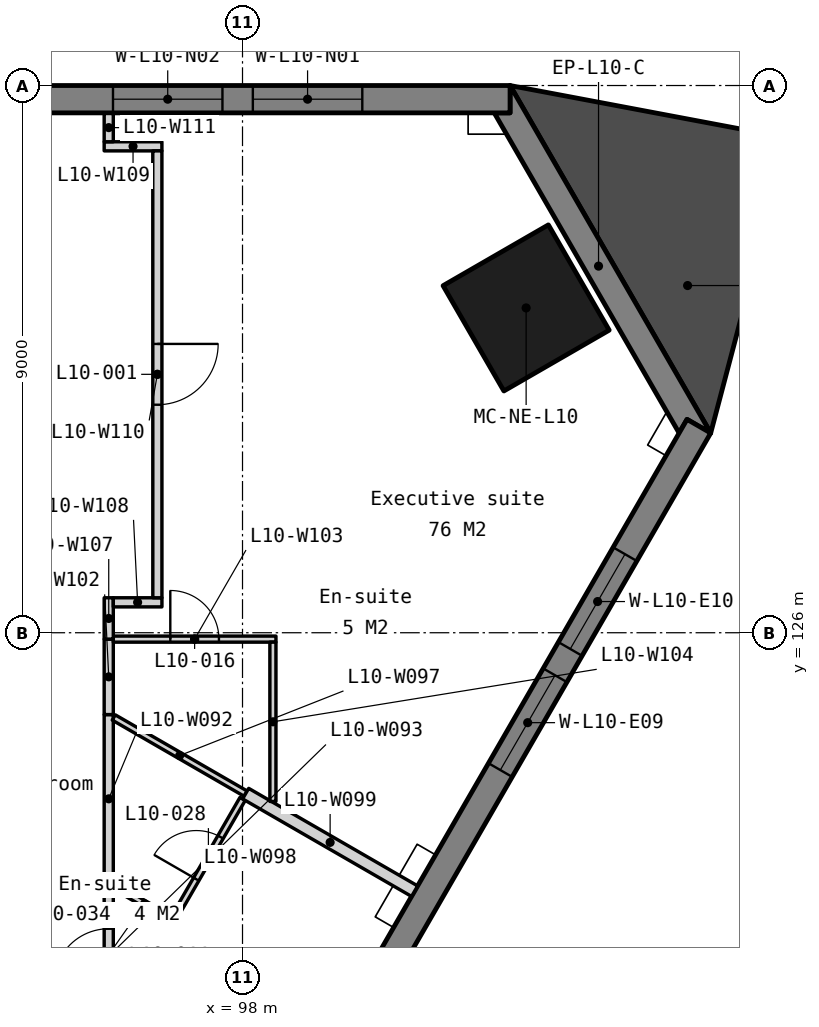
"""IFC4 building model, lengths in metres.
Left out: names, types, materials, properties, quantities, classifications, styles, units other than length and angle.
Written with IfcOpenShell. Run it as: python <this file> out.ifc"""

import sys

from ifc_helpers import new_model, si_unit, direction, frame, frame_2d, origin, origin_2d, place, context, subcontext, project, spatial, polyline, rectangle, outline, extrude, element, fill, save


model = new_model("IFC4")
c1 = context("Model", 3, precision=1e-05, world=origin(), true_north=direction((0.0, 1.0)))
c2 = subcontext(c1, "Body", "Model", "MODEL_VIEW")
j1 = project(units=[si_unit("LENGTHUNIT", "METRE"), si_unit("PLANEANGLEUNIT", "RADIAN")], contexts=[c1])
p1 = place(None, origin())
s1 = spatial("IfcSite", under=j1, at=p1, CompositionType="ELEMENT")
p2 = place(p1, origin())
s2 = spatial("IfcBuilding", under=s1, at=p2, CompositionType="ELEMENT")
p3 = place(p2, frame((0.0, 0.0, 49.0)))
s3 = spatial("IfcBuildingStorey", under=s2, at=p3, CompositionType="ELEMENT", Elevation=49.0)
p4 = place(p3, frame((102.664, 131.342, 0.0), z_axis=(0.0, 0.0, 1.0), x_axis=(-0.5, 0.866025403784, 0.0)))
e1 = element("IfcColumn", 1, at=p4, inside=s3, PredefinedType="COLUMN", context=c2, shape_type="SweptSolid", body=[
    extrude(rectangle(XDim=2.0, YDim=2.0, at=origin_2d()), origin(), (0.0, 0.0, 1.0), 3.5),
])
p5 = place(p3, frame((0.0, 0.0, -0.15)))
e2 = element("IfcWall", 2, at=p5, inside=s3, PredefinedType="SOLIDWALL", context=c2, shape_type="SweptSolid", body=[
    extrude(outline(polyline([(105.7, 129.284), (105.31, 129.509), (105.18, 129.284), (102.14, 134.55), (102.4, 134.55), (102.4, 135.0), (105.7, 129.284)])), origin(), (0.0, 0.0, 1.0), 3.5),
])
p6 = place(p3, frame((102.4, 134.775, -0.15), z_axis=(0.0, 0.0, 1.0), x_axis=(-1.0, 0.0, 0.0)))
e3 = element("IfcWall", 3, at=p6, inside=s3, PredefinedType="SOLIDWALL", context=c2, shape_type="SweptSolid", body=[
    extrude(outline(polyline([(0.0, 0.0), (0.0, 3.5), (38.62, 3.5), (38.62, 0.0), (0.0, 0.0)])), frame((0.0, 0.225, 0.0), z_axis=(0.0, -1.0, 0.0), x_axis=(1.0, 0.0, 0.0)), (0.0, 0.0, 1.0), 0.45),
])
p7 = place(p6, frame((2.43, 0.0, 1.05)))
e4 = element("IfcOpeningElement", 4, at=p7, cuts=e3, PredefinedType="OPENING", context=c2, shape_type="SweptSolid", body=[
    extrude(rectangle(XDim=1.8, YDim=1.5, at=frame_2d((0.9, 0.75))), frame((0.0, 0.235, 0.0), z_axis=(0.0, -1.0, 0.0), x_axis=(1.0, 0.0, 0.0)), (0.0, 0.0, 1.0), 0.47),
])
p8 = place(p6, frame((4.73, 0.0, 1.05)))
e5 = element("IfcOpeningElement", 5, at=p8, cuts=e3, PredefinedType="OPENING", context=c2, shape_type="SweptSolid", body=[
    extrude(rectangle(XDim=1.8, YDim=1.5, at=frame_2d((0.9, 0.75))), frame((0.0, 0.235, 0.0), z_axis=(0.0, -1.0, 0.0), x_axis=(1.0, 0.0, 0.0)), (0.0, 0.0, 1.0), 0.47),
])
p9 = place(p6, frame((11.39, 0.0, 1.05)))
e6 = element("IfcOpeningElement", 6, at=p9, cuts=e3, PredefinedType="OPENING", context=c2, shape_type="SweptSolid", body=[
    extrude(rectangle(XDim=1.8, YDim=1.5, at=frame_2d((0.9, 0.75))), frame((0.0, 0.235, 0.0), z_axis=(0.0, -1.0, 0.0), x_axis=(1.0, 0.0, 0.0)), (0.0, 0.0, 1.0), 0.47),
])
p10 = place(p6, frame((13.69, 0.0, 1.05)))
e7 = element("IfcOpeningElement", 7, at=p10, cuts=e3, PredefinedType="OPENING", context=c2, shape_type="SweptSolid", body=[
    extrude(rectangle(XDim=1.8, YDim=1.5, at=frame_2d((0.9, 0.75))), frame((0.0, 0.235, 0.0), z_axis=(0.0, -1.0, 0.0), x_axis=(1.0, 0.0, 0.0)), (0.0, 0.0, 1.0), 0.47),
])
p11 = place(p6, frame((20.35, 0.0, 1.05)))
e8 = element("IfcOpeningElement", 8, at=p11, cuts=e3, PredefinedType="OPENING", context=c2, shape_type="SweptSolid", body=[
    extrude(rectangle(XDim=1.8, YDim=1.5, at=frame_2d((0.9, 0.75))), frame((0.0, 0.235, 0.0), z_axis=(0.0, -1.0, 0.0), x_axis=(1.0, 0.0, 0.0)), (0.0, 0.0, 1.0), 0.47),
])
p12 = place(p6, frame((22.65, 0.0, 1.05)))
e9 = element("IfcOpeningElement", 9, at=p12, cuts=e3, PredefinedType="OPENING", context=c2, shape_type="SweptSolid", body=[
    extrude(rectangle(XDim=1.8, YDim=1.5, at=frame_2d((0.9, 0.75))), frame((0.0, 0.235, 0.0), z_axis=(0.0, -1.0, 0.0), x_axis=(1.0, 0.0, 0.0)), (0.0, 0.0, 1.0), 0.47),
])
p13 = place(p6, frame((29.31, 0.0, 1.05)))
e10 = element("IfcOpeningElement", 10, at=p13, cuts=e3, PredefinedType="OPENING", context=c2, shape_type="SweptSolid", body=[
    extrude(rectangle(XDim=1.8, YDim=1.5, at=frame_2d((0.9, 0.75))), frame((0.0, 0.235, 0.0), z_axis=(0.0, -1.0, 0.0), x_axis=(1.0, 0.0, 0.0)), (0.0, 0.0, 1.0), 0.47),
])
p14 = place(p6, frame((31.61, 0.0, 1.05)))
e11 = element("IfcOpeningElement", 11, at=p14, cuts=e3, PredefinedType="OPENING", context=c2, shape_type="SweptSolid", body=[
    extrude(rectangle(XDim=1.8, YDim=1.5, at=frame_2d((0.9, 0.75))), frame((0.0, 0.235, 0.0), z_axis=(0.0, -1.0, 0.0), x_axis=(1.0, 0.0, 0.0)), (0.0, 0.0, 1.0), 0.47),
])
p15 = place(p3, frame((83.105, 90.599, -0.15), z_axis=(0.0, 0.0, 1.0), x_axis=(0.499999201451, 0.866025864826, 0.0)))
e12 = element("IfcWall", 12, at=p15, inside=s3, PredefinedType="SOLIDWALL", context=c2, shape_type="SweptSolid", body=[
    extrude(outline(polyline([(44.8, 0.0), (44.8, 3.5), (0.0, 3.5), (0.0, 0.0), (44.8, 0.0)])), frame((0.0, 0.225, 0.0), z_axis=(0.0, -1.0, 0.0), x_axis=(1.0, 0.0, 0.0)), (0.0, 0.0, 1.0), 0.45),
])
p16 = place(p15, frame((2.43, 0.0, 1.05)))
e13 = element("IfcOpeningElement", 13, at=p16, cuts=e12, PredefinedType="OPENING", context=c2, shape_type="SweptSolid", body=[
    extrude(rectangle(XDim=1.8, YDim=1.5, at=frame_2d((0.9, 0.75))), frame((0.0, 0.235, 0.0), z_axis=(0.0, -1.0, 0.0), x_axis=(1.0, 0.0, 0.0)), (0.0, 0.0, 1.0), 0.47),
])
p17 = place(p15, frame((4.73, 0.0, 1.05)))
e14 = element("IfcOpeningElement", 14, at=p17, cuts=e12, PredefinedType="OPENING", context=c2, shape_type="SweptSolid", body=[
    extrude(rectangle(XDim=1.8, YDim=1.5, at=frame_2d((0.9, 0.75))), frame((0.0, 0.235, 0.0), z_axis=(0.0, -1.0, 0.0), x_axis=(1.0, 0.0, 0.0)), (0.0, 0.0, 1.0), 0.47),
])
p18 = place(p15, frame((11.39, 0.0, 1.05)))
e15 = element("IfcOpeningElement", 15, at=p18, cuts=e12, PredefinedType="OPENING", context=c2, shape_type="SweptSolid", body=[
    extrude(rectangle(XDim=1.8, YDim=1.5, at=frame_2d((0.9, 0.75))), frame((0.0, 0.235, 0.0), z_axis=(0.0, -1.0, 0.0), x_axis=(1.0, 0.0, 0.0)), (0.0, 0.0, 1.0), 0.47),
])
p19 = place(p15, frame((13.69, 0.0, 1.05)))
e16 = element("IfcOpeningElement", 16, at=p19, cuts=e12, PredefinedType="OPENING", context=c2, shape_type="SweptSolid", body=[
    extrude(rectangle(XDim=1.8, YDim=1.5, at=frame_2d((0.9, 0.75))), frame((0.0, 0.235, 0.0), z_axis=(0.0, -1.0, 0.0), x_axis=(1.0, 0.0, 0.0)), (0.0, 0.0, 1.0), 0.47),
])
p20 = place(p15, frame((20.35, 0.0, 1.05)))
e17 = element("IfcOpeningElement", 17, at=p20, cuts=e12, PredefinedType="OPENING", context=c2, shape_type="SweptSolid", body=[
    extrude(rectangle(XDim=1.8, YDim=1.5, at=frame_2d((0.9, 0.75))), frame((0.0, 0.235, 0.0), z_axis=(0.0, -1.0, 0.0), x_axis=(1.0, 0.0, 0.0)), (0.0, 0.0, 1.0), 0.47),
])
p21 = place(p15, frame((22.65, 0.0, 1.05)))
e18 = element("IfcOpeningElement", 18, at=p21, cuts=e12, PredefinedType="OPENING", context=c2, shape_type="SweptSolid", body=[
    extrude(rectangle(XDim=1.8, YDim=1.5, at=frame_2d((0.9, 0.75))), frame((0.0, 0.235, 0.0), z_axis=(0.0, -1.0, 0.0), x_axis=(1.0, 0.0, 0.0)), (0.0, 0.0, 1.0), 0.47),
])
p22 = place(p15, frame((29.31, 0.0, 1.05)))
e19 = element("IfcOpeningElement", 19, at=p22, cuts=e12, PredefinedType="OPENING", context=c2, shape_type="SweptSolid", body=[
    extrude(rectangle(XDim=1.8, YDim=1.5, at=frame_2d((0.9, 0.75))), frame((0.0, 0.235, 0.0), z_axis=(0.0, -1.0, 0.0), x_axis=(1.0, 0.0, 0.0)), (0.0, 0.0, 1.0), 0.47),
])
p23 = place(p15, frame((31.61, 0.0, 1.05)))
e20 = element("IfcOpeningElement", 20, at=p23, cuts=e12, PredefinedType="OPENING", context=c2, shape_type="SweptSolid", body=[
    extrude(rectangle(XDim=1.8, YDim=1.5, at=frame_2d((0.9, 0.75))), frame((0.0, 0.235, 0.0), z_axis=(0.0, -1.0, 0.0), x_axis=(1.0, 0.0, 0.0)), (0.0, 0.0, 1.0), 0.47),
])
p24 = place(p15, frame((38.27, 0.0, 1.05)))
e21 = element("IfcOpeningElement", 21, at=p24, cuts=e12, PredefinedType="OPENING", context=c2, shape_type="SweptSolid", body=[
    extrude(rectangle(XDim=1.8, YDim=1.5, at=frame_2d((0.9, 0.75))), frame((0.0, 0.235, 0.0), z_axis=(0.0, -1.0, 0.0), x_axis=(1.0, 0.0, 0.0)), (0.0, 0.0, 1.0), 0.47),
])
p25 = place(p15, frame((40.57, 0.0, 1.05)))
e22 = element("IfcOpeningElement", 22, at=p25, cuts=e12, PredefinedType="OPENING", context=c2, shape_type="SweptSolid", body=[
    extrude(rectangle(XDim=1.8, YDim=1.5, at=frame_2d((0.9, 0.75))), frame((0.0, 0.235, 0.0), z_axis=(0.0, -1.0, 0.0), x_axis=(1.0, 0.0, 0.0)), (0.0, 0.0, 1.0), 0.47),
])
p26 = place(p3, frame((0.0, 0.0, -0.15)))
e23 = element("IfcWall", 23, at=p26, inside=s3, PredefinedType="SOLIDWALL", context=c2, shape_type="SweptSolid", body=[
    extrude(outline(polyline([(105.7, 129.284), (106.981, 134.136), (102.4, 135.0), (105.7, 129.284)])), origin(), (0.0, 0.0, 1.0), 3.5),
])
p27 = place(p3, frame((95.882, 121.835, 0.0), z_axis=(0.0, 0.0, 1.0), x_axis=(0.86601174498, -0.500023656998, 0.0)))
e24 = element("IfcWall", 24, at=p27, inside=s3, PredefinedType="PARTITIONING", context=c2, shape_type="SweptSolid", body=[
    extrude(rectangle(XDim=1.169, YDim=0.1, at=frame_2d((0.585, 0.0))), origin(), (0.0, 0.0, 1.0), 3.35),
])
p28 = place(p3, frame((95.8, 121.883, 0.0), z_axis=(0.0, 0.0, 1.0), x_axis=(0.0, 1.0, 0.0)))
e25 = element("IfcWall", 25, at=p28, inside=s3, PredefinedType="PARTITIONING", context=c2, shape_type="SweptSolid", body=[
    extrude(rectangle(XDim=2.771, YDim=0.15, at=frame_2d((1.386, 0.0))), origin(), (0.0, 0.0, 1.0), 3.35),
])
p29 = place(p3, frame((95.8, 119.481, 0.0), z_axis=(0.0, 0.0, 1.0), x_axis=(0.0, 1.0, 0.0)))
e26 = element("IfcWall", 26, at=p29, inside=s3, PredefinedType="PARTITIONING", context=c2, shape_type="SweptSolid", body=[
    extrude(rectangle(XDim=2.402, YDim=0.15, at=frame_2d((1.201, 0.0))), origin(), (0.0, 0.0, 1.0), 3.35),
])
p30 = place(p29, frame((0.751, 0.0, 0.0)))
e27 = element("IfcOpeningElement", 27, at=p30, cuts=e26, PredefinedType="OPENING", context=c2, shape_type="SweptSolid", body=[
    extrude(rectangle(XDim=0.9, YDim=2.1, at=frame_2d((0.45, 1.05))), frame((0.0, 0.085, 0.0), z_axis=(0.0, -1.0, 0.0), x_axis=(1.0, 0.0, 0.0)), (0.0, 0.0, 1.0), 0.17),
])
p31 = place(p3, frame((95.882, 124.606, 0.0), z_axis=(0.0, 0.0, 1.0), x_axis=(0.866039519639, -0.499975549825, 0.0)))
e28 = element("IfcWall", 28, at=p31, inside=s3, PredefinedType="PARTITIONING", context=c2, shape_type="SweptSolid", body=[
    extrude(rectangle(XDim=2.505, YDim=0.1, at=frame_2d((1.252, 0.0))), origin(), (0.0, 0.0, 1.0), 3.35),
])
p32 = place(p3, frame((96.877, 121.319, 0.0), z_axis=(0.0, 0.0, 1.0), x_axis=(0.499966648284, 0.866044658551, 0.0)))
e29 = element("IfcWall", 29, at=p32, inside=s3, PredefinedType="PARTITIONING", context=c2, shape_type="SweptSolid", body=[
    extrude(rectangle(XDim=2.25, YDim=0.1, at=frame_2d((1.125, 0.0))), origin(), (0.0, 0.0, 1.0), 3.35),
])
p33 = place(p32, frame((0.725, 0.0, 0.0)))
e30 = element("IfcOpeningElement", 30, at=p33, cuts=e29, PredefinedType="OPENING", context=c2, shape_type="SweptSolid", body=[
    extrude(rectangle(XDim=0.8, YDim=2.1, at=frame_2d((0.4, 1.05))), frame((0.0, 0.06, 0.0), z_axis=(0.0, -1.0, 0.0), x_axis=(1.0, 0.0, 0.0)), (0.0, 0.0, 1.0), 0.12),
])
p34 = place(p3, frame((98.052, 123.354, 0.0), z_axis=(0.0, 0.0, 1.0), x_axis=(0.866019585306, -0.500010077765, 0.0)))
e31 = element("IfcWall", 31, at=p34, inside=s3, PredefinedType="PARTITIONING", context=c2, shape_type="SweptSolid", body=[
    extrude(rectangle(XDim=3.208, YDim=0.2, at=frame_2d((1.604, 0.0))), origin(), (0.0, 0.0, 1.0), 3.35),
])
p35 = place(p3, frame((95.8, 124.654, 0.0), z_axis=(0.0, 0.0, 1.0), x_axis=(0.0, 1.0, 0.0)))
e32 = element("IfcWall", 32, at=p35, inside=s3, PredefinedType="PARTITIONING", context=c2, shape_type="SweptSolid", body=[
    extrude(rectangle(XDim=1.241, YDim=0.15, at=frame_2d((0.621, 0.0))), origin(), (0.0, 0.0, 1.0), 3.35),
])
p36 = place(p3, frame((95.875, 125.895, 0.0), z_axis=(0.0, 0.0, 1.0), x_axis=(1.0, 0.0, 0.0)))
e33 = element("IfcWall", 33, at=p36, inside=s3, PredefinedType="PARTITIONING", context=c2, shape_type="SweptSolid", body=[
    extrude(rectangle(XDim=2.675, YDim=0.1, at=frame_2d((1.337, 0.0))), origin(), (0.0, 0.0, 1.0), 3.35),
])
p37 = place(p36, frame((0.938, 0.0, 0.0)))
e34 = element("IfcOpeningElement", 34, at=p37, cuts=e33, PredefinedType="OPENING", context=c2, shape_type="SweptSolid", body=[
    extrude(rectangle(XDim=0.8, YDim=2.1, at=frame_2d((0.4, 1.05))), frame((0.0, 0.06, 0.0), z_axis=(0.0, -1.0, 0.0), x_axis=(1.0, 0.0, 0.0)), (0.0, 0.0, 1.0), 0.12),
])
p38 = place(p3, frame((98.5, 123.225, 0.0), z_axis=(0.0, 0.0, 1.0), x_axis=(0.0, 1.0, 0.0)))
e35 = element("IfcWall", 35, at=p38, inside=s3, PredefinedType="PARTITIONING", context=c2, shape_type="SweptSolid", body=[
    extrude(rectangle(XDim=2.62, YDim=0.1, at=frame_2d((1.31, 0.0))), origin(), (0.0, 0.0, 1.0), 3.35),
])
p39 = place(p3, frame((95.8, 125.895, 0.0), z_axis=(0.0, 0.0, 1.0), x_axis=(0.0, 1.0, 0.0)))
e36 = element("IfcWall", 36, at=p39, inside=s3, PredefinedType="PARTITIONING", context=c2, shape_type="SweptSolid", body=[
    extrude(rectangle(XDim=0.68, YDim=0.15, at=frame_2d((0.34, 0.0))), origin(), (0.0, 0.0, 1.0), 3.35),
])
p40 = place(p3, frame((95.875, 126.5, 0.0), z_axis=(0.0, 0.0, 1.0), x_axis=(1.0, 0.0, 0.0)))
e37 = element("IfcWall", 37, at=p40, inside=s3, PredefinedType="PARTITIONING", context=c2, shape_type="SweptSolid", body=[
    extrude(rectangle(XDim=0.8, YDim=0.15, at=frame_2d((0.4, 0.0))), origin(), (0.0, 0.0, 1.0), 3.35),
])
p41 = place(p3, frame((95.725, 134.0, 0.0), z_axis=(0.0, 0.0, 1.0), x_axis=(1.0, 0.0, 0.0)))
e38 = element("IfcWall", 38, at=p41, inside=s3, PredefinedType="PARTITIONING", context=c2, shape_type="SweptSolid", body=[
    extrude(rectangle(XDim=0.949, YDim=0.15, at=frame_2d((0.475, 0.0))), origin(), (0.0, 0.0, 1.0), 2.887),
])
p42 = place(p3, frame((96.6, 133.925, 0.0), z_axis=(0.0, 0.0, 1.0), x_axis=(6.643194e-05, -0.999999997793, 0.0)))
e39 = element("IfcWall", 39, at=p42, inside=s3, PredefinedType="PARTITIONING", context=c2, shape_type="SweptSolid", body=[
    extrude(rectangle(XDim=7.35, YDim=0.15, at=frame_2d((3.675, 0.0))), origin(), (0.0, 0.0, 1.0), 3.35),
])
p43 = place(p42, frame((3.175, 0.0, 0.0)))
e40 = element("IfcOpeningElement", 40, at=p43, cuts=e39, PredefinedType="OPENING", context=c2, shape_type="SweptSolid", body=[
    extrude(rectangle(XDim=1.0, YDim=2.1, at=frame_2d((0.5, 1.05))), frame((0.0, 0.085, 0.0), z_axis=(0.0, -1.0, 0.0), x_axis=(1.0, 0.0, 0.0)), (0.0, 0.0, 1.0), 0.17),
])
p44 = place(p3, frame((95.8, 134.075, 0.0), z_axis=(0.0, 0.0, 1.0), x_axis=(0.0, 1.0, 0.0)))
e41 = element("IfcWall", 41, at=p44, inside=s3, PredefinedType="PARTITIONING", context=c2, shape_type="SweptSolid", body=[
    extrude(rectangle(XDim=0.465, YDim=0.15, at=frame_2d((0.232, 0.0))), origin(), (0.0, 0.0, 1.0), 3.35),
])
p45 = place(p7, origin())
e42 = element("IfcWindow", 42, at=p45, inside=s3, PartitioningType="SINGLE_PANEL", PredefinedType="WINDOW", context=c2, shape_type="SweptSolid", body=[
    extrude(rectangle(XDim=1.8, YDim=1.5, at=frame_2d((0.9, 0.75))), frame((0.0, 0.03, 0.0), z_axis=(0.0, -1.0, 0.0), x_axis=(1.0, 0.0, 0.0)), (0.0, 0.0, 1.0), 0.06),
])
fill(e4, e42)
p46 = place(p8, origin())
e43 = element("IfcWindow", 43, at=p46, inside=s3, PartitioningType="SINGLE_PANEL", PredefinedType="WINDOW", context=c2, shape_type="SweptSolid", body=[
    extrude(rectangle(XDim=1.8, YDim=1.5, at=frame_2d((0.9, 0.75))), frame((0.0, 0.03, 0.0), z_axis=(0.0, -1.0, 0.0), x_axis=(1.0, 0.0, 0.0)), (0.0, 0.0, 1.0), 0.06),
])
fill(e5, e43)
p47 = place(p24, origin())
e44 = element("IfcWindow", 44, at=p47, inside=s3, PartitioningType="SINGLE_PANEL", PredefinedType="WINDOW", context=c2, shape_type="SweptSolid", body=[
    extrude(rectangle(XDim=1.8, YDim=1.5, at=frame_2d((0.9, 0.75))), frame((0.0, 0.03, 0.0), z_axis=(0.0, -1.0, 0.0), x_axis=(1.0, 0.0, 0.0)), (0.0, 0.0, 1.0), 0.06),
])
fill(e21, e44)
p48 = place(p25, origin())
e45 = element("IfcWindow", 45, at=p48, inside=s3, PartitioningType="SINGLE_PANEL", PredefinedType="WINDOW", context=c2, shape_type="SweptSolid", body=[
    extrude(rectangle(XDim=1.8, YDim=1.5, at=frame_2d((0.9, 0.75))), frame((0.0, 0.03, 0.0), z_axis=(0.0, -1.0, 0.0), x_axis=(1.0, 0.0, 0.0)), (0.0, 0.0, 1.0), 0.06),
])
fill(e22, e45)
p49 = place(p43, origin())
e46 = element("IfcDoor", 46, at=p49, inside=s3, OperationType="SINGLE_SWING_LEFT", PredefinedType="DOOR", context=c2, shape_type="SweptSolid", body=[
    extrude(rectangle(XDim=1.0, YDim=2.1, at=frame_2d((0.5, 1.05))), frame((0.0, 0.025, 0.0), z_axis=(0.0, -1.0, 0.0), x_axis=(1.0, 0.0, 0.0)), (0.0, 0.0, 1.0), 0.05),
])
fill(e40, e46)
p50 = place(p30, origin())
e47 = element("IfcDoor", 47, at=p50, inside=s3, OperationType="SINGLE_SWING_LEFT", PredefinedType="DOOR", context=c2, shape_type="SweptSolid", body=[
    extrude(rectangle(XDim=0.9, YDim=2.1, at=frame_2d((0.45, 1.05))), frame((0.0, 0.025, 0.0), z_axis=(0.0, -1.0, 0.0), x_axis=(1.0, 0.0, 0.0)), (0.0, 0.0, 1.0), 0.05),
])
fill(e27, e47)
p51 = place(p37, origin())
e48 = element("IfcDoor", 48, at=p51, inside=s3, OperationType="SINGLE_SWING_LEFT", PredefinedType="DOOR", context=c2, shape_type="SweptSolid", body=[
    extrude(rectangle(XDim=0.8, YDim=2.1, at=frame_2d((0.4, 1.05))), frame((0.0, 0.025, 0.0), z_axis=(0.0, -1.0, 0.0), x_axis=(1.0, 0.0, 0.0)), (0.0, 0.0, 1.0), 0.05),
])
fill(e34, e48)
p52 = place(p33, origin())
e49 = element("IfcDoor", 49, at=p52, inside=s3, OperationType="SINGLE_SWING_LEFT", PredefinedType="DOOR", context=c2, shape_type="SweptSolid", body=[
    extrude(rectangle(XDim=0.8, YDim=2.1, at=frame_2d((0.4, 1.05))), frame((0.0, 0.025, 0.0), z_axis=(0.0, -1.0, 0.0), x_axis=(1.0, 0.0, 0.0)), (0.0, 0.0, 1.0), 0.05),
])
fill(e30, e49)
save(model, sys.argv[1])
